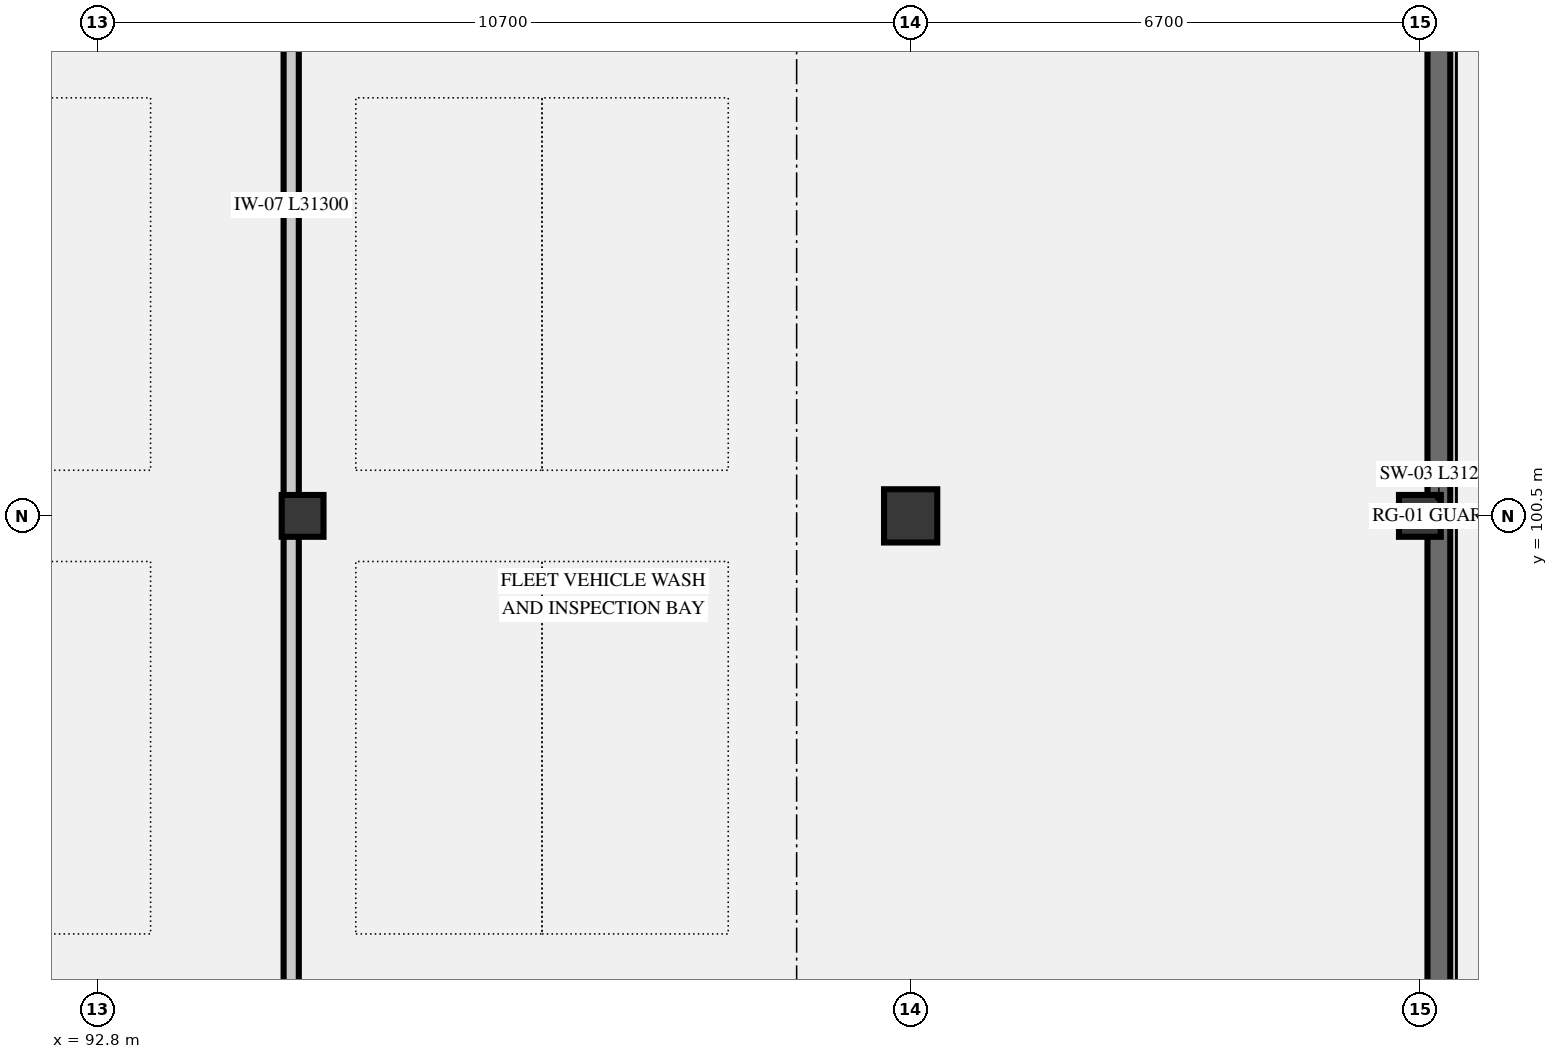
"""IFC4 building model, lengths in metres.
Left out: names, types, materials, properties, quantities, classifications, styles, units other than length and angle.
Written with IfcOpenShell. Run it as: python <this file> out.ifc"""

import sys

from ifc_helpers import new_model, si_unit, direction, frame, frame_2d, origin, origin_2d, place, context, subcontext, project, spatial, rectangle, extrude, element, save


model = new_model("IFC4")
c1 = context("Model", 3, precision=1e-05, world=origin(), true_north=direction((0.0, 1.0)))
c2 = subcontext(c1, "Body", "Model", "MODEL_VIEW")
j1 = project(units=[si_unit("LENGTHUNIT", "METRE"), si_unit("PLANEANGLEUNIT", "RADIAN")], contexts=[c1])
p1 = place(None, origin())
s1 = spatial("IfcSite", under=j1, at=p1, CompositionType="ELEMENT")
p2 = place(p1, origin())
s2 = spatial("IfcBuilding", under=s1, at=p2, CompositionType="ELEMENT")
p3 = place(p2, frame((0.0, 0.0, -8.4)))
s3 = spatial("IfcBuildingStorey", under=s2, at=p3, CompositionType="ELEMENT", Elevation=-8.4)
p4 = place(p3, frame((103.5, 100.5, -0.44), z_axis=(0.0, 0.0, 1.0), x_axis=(1.0, 0.0, 0.0)))
e1 = element("IfcColumn", 1, at=p4, inside=s3, PredefinedType="COLUMN", context=c2, shape_type="SweptSolid", body=[
    extrude(rectangle(XDim=0.7, YDim=0.7, at=origin_2d()), origin(), (0.0, 0.0, 1.0), 4.64),
])
for number, where, z_axis, x_axis in (
    (2, (110.2, 100.5, -0.44), (0.0, 0.0, 1.0), (1.0, 0.0, 0.0)),
    (3, (95.5, 100.5, -0.44), (0.0, 0.0, 1.0), (1.0, 0.0, 0.0)),
):
    element("IfcColumn", number, at=place(p3, frame(where, z_axis=z_axis, x_axis=x_axis)), inside=s3, PredefinedType="COLUMN", context=c2, shape_type="SweptSolid", body=[
        extrude(rectangle(XDim=0.55, YDim=0.55, at=origin_2d()), origin(), (0.0, 0.0, 1.0), 4.64),
    ])
p5 = place(p3, frame((110.45, 85.15, 0.0), z_axis=(0.0, 0.0, 1.0), x_axis=(0.0, 1.0, 0.0)))
e4 = element("IfcWall", 4, at=p5, inside=s3, PredefinedType="SHEAR", context=c2, shape_type="SweptSolid", body=[
    extrude(rectangle(XDim=31.2, YDim=0.3, at=frame_2d((15.6, 0.0))), origin(), (0.0, 0.0, 1.0), 3.92),
])
p6 = place(p3, frame((95.35, 85.2, 0.0), z_axis=(0.0, 0.0, 1.0), x_axis=(0.0, 1.0, 0.0)))
e5 = element("IfcWall", 5, at=p6, inside=s3, PredefinedType="PARTITIONING", context=c2, shape_type="SweptSolid", body=[
    extrude(rectangle(XDim=31.3, YDim=0.2, at=frame_2d((15.65, 0.0))), origin(), (0.0, 0.0, 1.0), 3.01),
])
p7 = place(p6, frame((6.0, 0.0, 0.0)))
e6 = element("IfcOpeningElement", 6, at=p7, cuts=e5, PredefinedType="OPENING", context=c2, shape_type="SweptSolid", body=[
    extrude(rectangle(XDim=1.48, YDim=2.28, at=frame_2d((0.74, 1.14))), frame((0.0, 0.11, 0.0), z_axis=(0.0, -1.0, 0.0), x_axis=(1.0, 0.0, 0.0)), (0.0, 0.0, 1.0), 0.22),
])
save(model, sys.argv[1])
